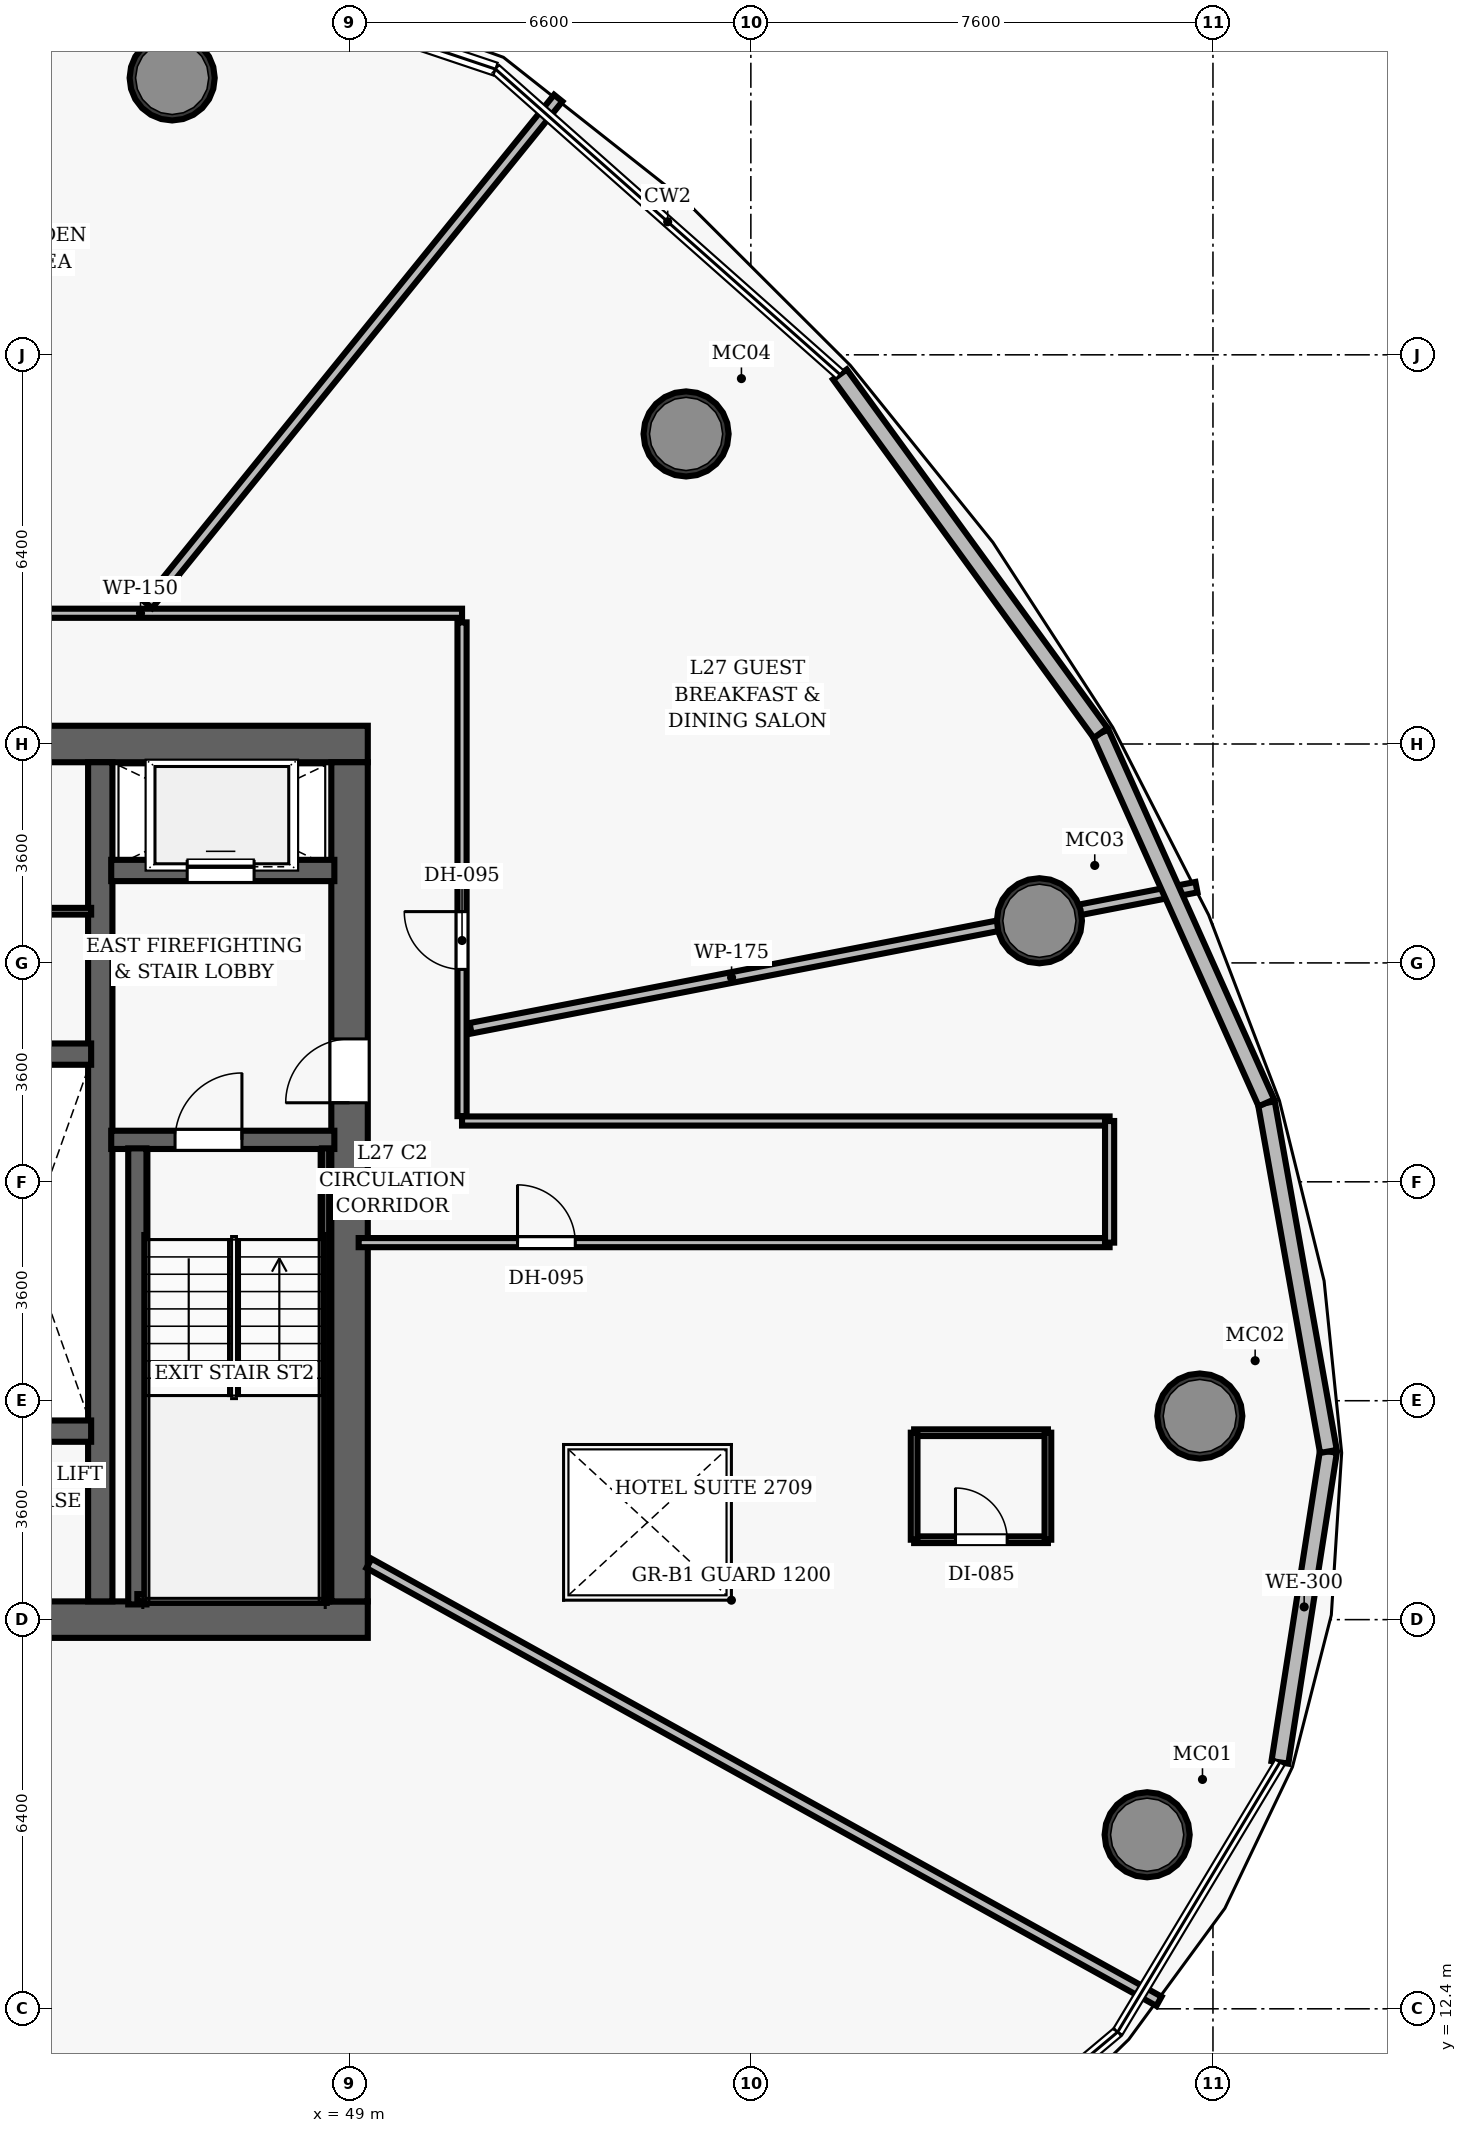
"""IFC4 building model, lengths in metres.
Left out: names, types, materials, properties, quantities, classifications, styles, units other than length and angle.
Written with IfcOpenShell. Run it as: python <this file> out.ifc"""

import sys

from ifc_helpers import new_model, si_unit, direction, frame, frame_2d, origin, origin_2d, place, context, subcontext, project, spatial, rectangle, hollow_circle, extrude, element, fill, save


model = new_model("IFC4")
c1 = context("Model", 3, precision=1e-05, world=origin(), true_north=direction((0.0, 1.0)))
c2 = subcontext(c1, "Body", "Model", "MODEL_VIEW")
j1 = project(units=[si_unit("LENGTHUNIT", "METRE"), si_unit("PLANEANGLEUNIT", "RADIAN")], contexts=[c1])
p1 = place(None, origin())
s1 = spatial("IfcSite", under=j1, at=p1, CompositionType="ELEMENT")
p2 = place(p1, origin())
s2 = spatial("IfcBuilding", under=s1, at=p2, CompositionType="ELEMENT")
p3 = place(p2, frame((0.0, 0.0, 113.3)))
s3 = spatial("IfcBuildingStorey", under=s2, at=p3, CompositionType="ELEMENT", Elevation=113.3)
p4 = place(p3, frame((26.7, 18.8, 0.0), z_axis=(0.0, 0.0, 1.0), x_axis=(1.0, 0.0, 0.0)))
e1 = element("IfcWall", 1, at=p4, inside=s3, PredefinedType="SHEAR", context=c2, shape_type="SweptSolid", body=[
    extrude(rectangle(XDim=22.6, YDim=0.6, at=frame_2d((11.3, 0.0))), origin(), (0.0, 0.0, 1.0), 3.5),
])
p5 = place(p4, frame((14.52, 0.0, 0.0)))
e2 = element("IfcOpeningElement", 2, at=p5, cuts=e1, PredefinedType="OPENING", context=c2, shape_type="SweptSolid", body=[
    extrude(rectangle(XDim=1.05, YDim=2.15, at=frame_2d((0.525, 1.075))), frame((0.0, 0.31, 0.0), z_axis=(0.0, -1.0, 0.0), x_axis=(1.0, 0.0, 0.0)), (0.0, 0.0, 1.0), 0.62),
])
p6 = place(p3, frame((26.7, 33.2, 0.0), z_axis=(0.0, 0.0, 1.0), x_axis=(1.0, 0.0, 0.0)))
e3 = element("IfcWall", 3, at=p6, inside=s3, PredefinedType="SHEAR", context=c2, shape_type="SweptSolid", body=[
    extrude(rectangle(XDim=22.6, YDim=0.6, at=frame_2d((11.3, 0.0))), origin(), (0.0, 0.0, 1.0), 3.5),
])
p7 = place(p6, frame((4.62, 0.0, 0.0)))
e4 = element("IfcOpeningElement", 4, at=p7, cuts=e3, PredefinedType="OPENING", context=c2, shape_type="SweptSolid", body=[
    extrude(rectangle(XDim=1.05, YDim=2.15, at=frame_2d((0.525, 1.075))), frame((0.0, 0.31, 0.0), z_axis=(0.0, -1.0, 0.0), x_axis=(1.0, 0.0, 0.0)), (0.0, 0.0, 1.0), 0.62),
])
p8 = place(p6, frame((14.52, 0.0, 0.0)))
e5 = element("IfcOpeningElement", 5, at=p8, cuts=e3, PredefinedType="OPENING", context=c2, shape_type="SweptSolid", body=[
    extrude(rectangle(XDim=1.05, YDim=2.15, at=frame_2d((0.525, 1.075))), frame((0.0, 0.31, 0.0), z_axis=(0.0, -1.0, 0.0), x_axis=(1.0, 0.0, 0.0)), (0.0, 0.0, 1.0), 0.62),
])
p9 = place(p3, frame((49.0, 19.1, 0.0), z_axis=(0.0, 0.0, 1.0), x_axis=(0.0, 1.0, 0.0)))
e6 = element("IfcWall", 6, at=p9, inside=s3, PredefinedType="SHEAR", context=c2, shape_type="SweptSolid", body=[
    extrude(rectangle(XDim=13.8, YDim=0.6, at=frame_2d((6.9, 0.0))), origin(), (0.0, 0.0, 1.0), 3.5),
])
p10 = place(p9, frame((8.2, 0.0, 0.0)))
e7 = element("IfcOpeningElement", 7, at=p10, cuts=e6, PredefinedType="OPENING", context=c2, shape_type="SweptSolid", body=[
    extrude(rectangle(XDim=1.05, YDim=2.15, at=frame_2d((0.525, 1.075))), frame((0.0, 0.31, 0.0), z_axis=(0.0, -1.0, 0.0), x_axis=(1.0, 0.0, 0.0)), (0.0, 0.0, 1.0), 0.62),
])
p11 = place(p3, frame((44.9, 19.1, 0.0), z_axis=(0.0, 0.0, 1.0), x_axis=(0.0, 1.0, 0.0)))
e8 = element("IfcWall", 8, at=p11, inside=s3, PredefinedType="SHEAR", context=c2, shape_type="SweptSolid", body=[
    extrude(rectangle(XDim=13.8, YDim=0.4, at=frame_2d((6.9, 0.0))), origin(), (0.0, 0.0, 1.0), 3.5),
])
for number, where, z_axis, x_axis in (
    (9, (62.118, 15.262, 0.0), (0.0, 0.0, 1.0), (1.0, 0.0, 0.0)),
    (10, (62.984, 22.148, 0.0), (0.0, 0.0, 1.0), (1.0, 0.0, 0.0)),
    (11, (60.346, 30.293, 0.0), (0.0, 0.0, 1.0), (1.0, 0.0, 0.0)),
    (12, (54.535, 38.299, 0.0), (0.0, 0.0, 1.0), (1.0, 0.0, 0.0)),
    (13, (46.083, 44.154, 0.0), (0.0, 0.0, 1.0), (1.0, 0.0, 0.0)),
):
    element("IfcColumn", number, at=place(p3, frame(where, z_axis=z_axis, x_axis=x_axis)), inside=s3, PredefinedType="COLUMN", context=c2, shape_type="SweptSolid", body=[
        extrude(hollow_circle(Radius=0.7, WallThickness=0.055, at=origin_2d()), origin(), (0.0, 0.0, 1.0), 3.5),
    ])
p12 = place(p3, frame((45.08, 26.69, 0.0), z_axis=(0.0, 0.0, 1.0), x_axis=(1.0, 0.0, 0.0)))
e14 = element("IfcWall", 14, at=p12, inside=s3, PredefinedType="SHEAR", context=c2, shape_type="SweptSolid", body=[
    extrude(rectangle(XDim=3.67, YDim=0.3, at=frame_2d((1.835, 0.0))), origin(), (0.0, 0.0, 1.0), 3.5),
])
p13 = place(p12, frame((1.05, 0.0, 0.0)))
e15 = element("IfcOpeningElement", 15, at=p13, cuts=e14, PredefinedType="OPENING", context=c2, shape_type="SweptSolid", body=[
    extrude(rectangle(XDim=1.1, YDim=2.15, at=frame_2d((0.55, 1.075))), frame((0.0, 0.16, 0.0), z_axis=(0.0, -1.0, 0.0), x_axis=(1.0, 0.0, 0.0)), (0.0, 0.0, 1.0), 0.32),
])
p14 = place(p3, frame((45.51, 19.05, 0.0), z_axis=(0.0, 0.0, 1.0), x_axis=(0.0, 1.0, 0.0)))
e16 = element("IfcWall", 16, at=p14, inside=s3, PredefinedType="SHEAR", context=c2, shape_type="SweptSolid", body=[
    extrude(rectangle(XDim=7.5, YDim=0.3, at=frame_2d((3.75, 0.0))), origin(), (0.0, 0.0, 1.0), 3.5),
])
p15 = place(p3, frame((48.605, 19.1, 0.0), z_axis=(0.0, 0.0, 1.0), x_axis=(0.0, 1.0, 0.0)))
e17 = element("IfcWall", 17, at=p15, inside=s3, PredefinedType="SHEAR", context=c2, shape_type="SweptSolid", body=[
    extrude(rectangle(XDim=7.45, YDim=0.12, at=frame_2d((3.725, 0.0))), origin(), (0.0, 0.0, 1.0), 3.5),
])
p16 = place(p3, frame((45.51, 19.16, 0.0), z_axis=(0.0, 0.0, 1.0), x_axis=(1.0, 0.0, 0.0)))
e18 = element("IfcWall", 18, at=p16, inside=s3, PredefinedType="SHEAR", context=c2, shape_type="SweptSolid", body=[
    extrude(rectangle(XDim=3.095, YDim=0.12, at=frame_2d((1.547, 0.0))), origin(), (0.0, 0.0, 1.0), 3.5),
])
p17 = place(p3, frame((45.08, 31.12, 0.0), z_axis=(0.0, 0.0, 1.0), x_axis=(1.0, 0.0, 0.0)))
e19 = element("IfcWall", 19, at=p17, inside=s3, PredefinedType="SHEAR", context=c2, shape_type="SweptSolid", body=[
    extrude(rectangle(XDim=3.67, YDim=0.35, at=frame_2d((1.835, 0.0))), origin(), (0.0, 0.0, 1.0), 2.675),
])
p18 = place(p17, frame((1.25, 0.0, 0.0)))
e20 = element("IfcOpeningElement", 20, at=p18, cuts=e19, PredefinedType="OPENING", context=c2, shape_type="SweptSolid", body=[
    extrude(rectangle(XDim=1.1, YDim=2.15, at=frame_2d((0.55, 1.075))), frame((0.0, 0.185, 0.0), z_axis=(0.0, -1.0, 0.0), x_axis=(1.0, 0.0, 0.0)), (0.0, 0.0, 1.0), 0.37),
])
for number, where, z_axis, x_axis in (
    (21, (42.72, 21.9, 0.0), (0.0, 0.0, 1.0), (1.0, 0.0, 0.0)),
    (22, (42.72, 28.1, 0.0), (0.0, 0.0, 1.0), (1.0, 0.0, 0.0)),
):
    element("IfcWall", number, at=place(p3, frame(where, z_axis=z_axis, x_axis=x_axis)), inside=s3, PredefinedType="SHEAR", context=c2, shape_type="SweptSolid", body=[
        extrude(rectangle(XDim=2.03, YDim=0.35, at=frame_2d((1.015, 0.0))), origin(), (0.0, 0.0, 1.0), 2.675),
    ])
p19 = place(p3, frame((42.55, 30.45, 0.0), z_axis=(0.0, 0.0, 1.0), x_axis=(1.0, 0.0, 0.0)))
e23 = element("IfcWall", 23, at=p19, inside=s3, PredefinedType="PARTITIONING", context=c2, shape_type="SweptSolid", body=[
    extrude(rectangle(XDim=2.2, YDim=0.11, at=frame_2d((1.1, 0.0))), origin(), (0.0, 0.0, 1.0), 2.675),
])
p20 = place(p3, frame((24.85, 35.35, 0.0), z_axis=(0.0, 0.0, 1.0), x_axis=(1.0, 0.0, 0.0)))
e24 = element("IfcWall", 24, at=p20, inside=s3, PredefinedType="PARTITIONING", context=c2, shape_type="SweptSolid", body=[
    extrude(rectangle(XDim=26.0, YDim=0.15, at=frame_2d((13.0, 0.0))), origin(), (0.0, 0.0, 1.0), 2.675),
])
p21 = place(p20, frame((14.325, 0.0, 0.0)))
e25 = element("IfcOpeningElement", 25, at=p21, cuts=e24, PredefinedType="OPENING", context=c2, shape_type="SweptSolid", body=[
    extrude(rectangle(XDim=0.95, YDim=2.15, at=frame_2d((0.475, 1.075))), frame((0.0, 0.085, 0.0), z_axis=(0.0, -1.0, 0.0), x_axis=(1.0, 0.0, 0.0)), (0.0, 0.0, 1.0), 0.17),
])
p22 = place(p20, frame((7.162, 0.0, 0.0)))
e26 = element("IfcOpeningElement", 26, at=p22, cuts=e24, PredefinedType="OPENING", context=c2, shape_type="SweptSolid", body=[
    extrude(rectangle(XDim=0.95, YDim=2.15, at=frame_2d((0.475, 1.075))), frame((0.0, 0.085, 0.0), z_axis=(0.0, -1.0, 0.0), x_axis=(1.0, 0.0, 0.0)), (0.0, 0.0, 1.0), 0.17),
])
p23 = place(p3, frame((50.85, 27.08, 0.0), z_axis=(0.0, 0.0, 1.0), x_axis=(0.0, 1.0, 0.0)))
e27 = element("IfcWall", 27, at=p23, inside=s3, PredefinedType="PARTITIONING", context=c2, shape_type="SweptSolid", body=[
    extrude(rectangle(XDim=8.12, YDim=0.15, at=frame_2d((4.06, 0.0))), origin(), (0.0, 0.0, 1.0), 2.675),
])
p24 = place(p23, frame((2.414, 0.0, 0.0)))
e28 = element("IfcOpeningElement", 28, at=p24, cuts=e27, PredefinedType="OPENING", context=c2, shape_type="SweptSolid", body=[
    extrude(rectangle(XDim=0.95, YDim=2.15, at=frame_2d((0.475, 1.075))), frame((0.0, 0.085, 0.0), z_axis=(0.0, -1.0, 0.0), x_axis=(1.0, 0.0, 0.0)), (0.0, 0.0, 1.0), 0.17),
])
p25 = place(p3, frame((50.85, 27.0, 0.0), z_axis=(0.0, 0.0, 1.0), x_axis=(1.0, 0.0, 0.0)))
e29 = element("IfcWall", 29, at=p25, inside=s3, PredefinedType="PARTITIONING", context=c2, shape_type="SweptSolid", body=[
    extrude(rectangle(XDim=10.65, YDim=0.15, at=frame_2d((5.325, 0.0))), origin(), (0.0, 0.0, 1.0), 2.675),
])
p26 = place(p3, frame((49.15, 25.0, 0.0), z_axis=(0.0, 0.0, 1.0), x_axis=(1.0, 0.0, 0.0)))
e30 = element("IfcWall", 30, at=p26, inside=s3, PredefinedType="PARTITIONING", context=c2, shape_type="SweptSolid", body=[
    extrude(rectangle(XDim=12.35, YDim=0.15, at=frame_2d((6.175, 0.0))), origin(), (0.0, 0.0, 1.0), 2.675),
])
p27 = place(p26, frame((2.613, 0.0, 0.0)))
e31 = element("IfcOpeningElement", 31, at=p27, cuts=e30, PredefinedType="OPENING", context=c2, shape_type="SweptSolid", body=[
    extrude(rectangle(XDim=0.95, YDim=2.15, at=frame_2d((0.475, 1.075))), frame((0.0, 0.085, 0.0), z_axis=(0.0, -1.0, 0.0), x_axis=(1.0, 0.0, 0.0)), (0.0, 0.0, 1.0), 0.17),
])
p28 = place(p3, frame((61.5, 25.0, 0.0), z_axis=(0.0, 0.0, 1.0), x_axis=(0.0, 1.0, 0.0)))
e32 = element("IfcWall", 32, at=p28, inside=s3, PredefinedType="PARTITIONING", context=c2, shape_type="SweptSolid", body=[
    extrude(rectangle(XDim=2.0, YDim=0.15, at=frame_2d((1.0, 0.0))), origin(), (0.0, 0.0, 1.0), 2.675),
])
p29 = place(p3, frame((50.99, 28.525, 0.0), z_axis=(0.0, 0.0, 1.0), x_axis=(0.981623433526, 0.190828286041, 0.0)))
e33 = element("IfcWall", 33, at=p29, inside=s3, PredefinedType="PARTITIONING", context=c2, shape_type="SweptSolid", body=[
    extrude(rectangle(XDim=12.162, YDim=0.175, at=frame_2d((6.081, 0.0))), origin(), (0.0, 0.0, 1.0), 2.675),
])
p30 = place(p3, frame((45.685, 35.49, 0.0), z_axis=(0.0, 0.0, 1.0), x_axis=(0.629313518397, 0.777151526771, 0.0)))
e34 = element("IfcWall", 34, at=p30, inside=s3, PredefinedType="PARTITIONING", context=c2, shape_type="SweptSolid", body=[
    extrude(rectangle(XDim=10.721, YDim=0.175, at=frame_2d((5.36, 0.0))), origin(), (0.0, 0.0, 1.0), 2.675),
])
p31 = place(p3, frame((41.643, 16.51, 0.0), z_axis=(0.0, 0.0, 1.0), x_axis=(0.358375658047, -0.933577467444, 0.0)))
e35 = element("IfcWall", 35, at=p31, inside=s3, PredefinedType="PARTITIONING", context=c2, shape_type="SweptSolid", body=[
    extrude(rectangle(XDim=13.612, YDim=0.175, at=frame_2d((6.806, 0.0))), origin(), (0.0, 0.0, 1.0), 2.675),
])
p32 = place(p3, frame((49.32, 19.725, 0.0), z_axis=(0.0, 0.0, 1.0), x_axis=(0.874623583145, -0.484802627681, 0.0)))
e36 = element("IfcWall", 36, at=p32, inside=s3, PredefinedType="PARTITIONING", context=c2, shape_type="SweptSolid", body=[
    extrude(rectangle(XDim=14.854, YDim=0.175, at=frame_2d((7.427, 0.0))), origin(), (0.0, 0.0, 1.0), 2.675),
])
p33 = place(p3, frame((58.285, 20.114, 0.0), z_axis=(0.0, 0.0, 1.0), x_axis=(1.0, 0.0, 0.0)))
e37 = element("IfcWall", 37, at=p33, inside=s3, PredefinedType="PARTITIONING", context=c2, shape_type="SweptSolid", body=[
    extrude(rectangle(XDim=2.2, YDim=0.11, at=frame_2d((1.1, 0.0))), origin(), (0.0, 0.0, 1.0), 2.675),
])
p34 = place(p33, frame((0.68, 0.0, 0.0)))
e38 = element("IfcOpeningElement", 38, at=p34, cuts=e37, PredefinedType="OPENING", context=c2, shape_type="SweptSolid", body=[
    extrude(rectangle(XDim=0.85, YDim=2.1, at=frame_2d((0.425, 1.05))), frame((0.0, 0.065, 0.0), z_axis=(0.0, -1.0, 0.0), x_axis=(1.0, 0.0, 0.0)), (0.0, 0.0, 1.0), 0.13),
])
p35 = place(p3, frame((58.285, 21.874, 0.0), z_axis=(0.0, 0.0, 1.0), x_axis=(1.0, 0.0, 0.0)))
e39 = element("IfcWall", 39, at=p35, inside=s3, PredefinedType="PARTITIONING", context=c2, shape_type="SweptSolid", body=[
    extrude(rectangle(XDim=2.2, YDim=0.11, at=frame_2d((1.1, 0.0))), origin(), (0.0, 0.0, 1.0), 2.675),
])
for number, where, z_axis, x_axis in (
    (40, (58.285, 20.114, 0.0), (0.0, 0.0, 1.0), (0.0, 1.0, 0.0)),
    (41, (60.485, 20.114, 0.0), (0.0, 0.0, 1.0), (0.0, 1.0, 0.0)),
):
    element("IfcWall", number, at=place(p3, frame(where, z_axis=z_axis, x_axis=x_axis)), inside=s3, PredefinedType="PARTITIONING", context=c2, shape_type="SweptSolid", body=[
        extrude(rectangle(XDim=1.76, YDim=0.11, at=frame_2d((0.88, 0.0))), origin(), (0.0, 0.0, 1.0), 2.675),
    ])
p36 = place(p3, frame((65.099, 21.566, 0.0), z_axis=(0.0, 0.0, 1.0), x_axis=(-0.154237267415, -0.988033838156, 0.0)))
e42 = element("IfcWall", 42, at=p36, inside=s3, PredefinedType="SOLIDWALL", context=c2, shape_type="SweptSolid", body=[
    extrude(rectangle(XDim=5.175, YDim=0.28, at=frame_2d((2.587, 0.0))), origin(), (0.0, 0.0, 1.0), 3.26),
])
p37 = place(p3, frame((64.079, 27.298, 0.0), z_axis=(0.0, 0.0, 1.0), x_axis=(0.1752202949, -0.984529252107, 0.0)))
e43 = element("IfcWall", 43, at=p37, inside=s3, PredefinedType="SOLIDWALL", context=c2, shape_type="SweptSolid", body=[
    extrude(rectangle(XDim=5.823, YDim=0.28, at=frame_2d((2.911, 0.0))), origin(), (0.0, 0.0, 1.0), 3.26),
])
p38 = place(p3, frame((61.353, 33.381, 0.0), z_axis=(0.0, 0.0, 1.0), x_axis=(0.408937052671, -0.912562593444, 0.0)))
e44 = element("IfcWall", 44, at=p38, inside=s3, PredefinedType="SOLIDWALL", context=c2, shape_type="SweptSolid", body=[
    extrude(rectangle(XDim=6.665, YDim=0.28, at=frame_2d((3.333, 0.0))), origin(), (0.0, 0.0, 1.0), 3.26),
])
p39 = place(p3, frame((57.064, 39.278, 0.0), z_axis=(0.0, 0.0, 1.0), x_axis=(0.588127899996, -0.808767935347, 0.0)))
e45 = element("IfcWall", 45, at=p39, inside=s3, PredefinedType="SOLIDWALL", context=c2, shape_type="SweptSolid", body=[
    extrude(rectangle(XDim=7.292, YDim=0.28, at=frame_2d((3.646, 0.0))), origin(), (0.0, 0.0, 1.0), 3.26),
])
p40 = place(p13, origin())
e46 = element("IfcDoor", 46, at=p40, inside=s3, OperationType="SINGLE_SWING_RIGHT", PredefinedType="DOOR", context=c2, shape_type="SweptSolid", body=[
    extrude(rectangle(XDim=1.1, YDim=2.15, at=frame_2d((0.55, 1.075))), frame((0.0, 0.025, 0.0), z_axis=(0.0, -1.0, 0.0), x_axis=(1.0, 0.0, 0.0)), (0.0, 0.0, 1.0), 0.05),
])
fill(e15, e46)
p41 = place(p10, origin())
e47 = element("IfcDoor", 47, at=p41, inside=s3, OperationType="SINGLE_SWING_LEFT", PredefinedType="DOOR", context=c2, shape_type="SweptSolid", body=[
    extrude(rectangle(XDim=1.05, YDim=2.15, at=frame_2d((0.525, 1.075))), frame((0.0, 0.025, 0.0), z_axis=(0.0, -1.0, 0.0), x_axis=(1.0, 0.0, 0.0)), (0.0, 0.0, 1.0), 0.05),
])
fill(e7, e47)
p42 = place(p24, origin())
e48 = element("IfcDoor", 48, at=p42, inside=s3, OperationType="SINGLE_SWING_RIGHT", PredefinedType="DOOR", context=c2, shape_type="SweptSolid", body=[
    extrude(rectangle(XDim=0.95, YDim=2.15, at=frame_2d((0.475, 1.075))), frame((0.0, 0.025, 0.0), z_axis=(0.0, -1.0, 0.0), x_axis=(1.0, 0.0, 0.0)), (0.0, 0.0, 1.0), 0.05),
])
fill(e28, e48)
p43 = place(p27, origin())
e49 = element("IfcDoor", 49, at=p43, inside=s3, OperationType="SINGLE_SWING_LEFT", PredefinedType="DOOR", context=c2, shape_type="SweptSolid", body=[
    extrude(rectangle(XDim=0.95, YDim=2.15, at=frame_2d((0.475, 1.075))), frame((0.0, 0.025, 0.0), z_axis=(0.0, -1.0, 0.0), x_axis=(1.0, 0.0, 0.0)), (0.0, 0.0, 1.0), 0.05),
])
fill(e31, e49)
p44 = place(p34, origin())
e50 = element("IfcDoor", 50, at=p44, inside=s3, OperationType="SINGLE_SWING_LEFT", PredefinedType="DOOR", context=c2, shape_type="SweptSolid", body=[
    extrude(rectangle(XDim=0.85, YDim=2.1, at=frame_2d((0.425, 1.05))), frame((0.0, 0.025, 0.0), z_axis=(0.0, -1.0, 0.0), x_axis=(1.0, 0.0, 0.0)), (0.0, 0.0, 1.0), 0.05),
])
fill(e38, e50)
p45 = place(p18, origin())
e51 = element("IfcDoor", 51, at=p45, inside=s3, OperationType="SLIDING_TO_LEFT", PredefinedType="DOOR", context=c2, shape_type="SweptSolid", body=[
    extrude(rectangle(XDim=1.1, YDim=2.15, at=frame_2d((0.55, 1.075))), frame((0.0, 0.025, 0.0), z_axis=(0.0, -1.0, 0.0), x_axis=(1.0, 0.0, 0.0)), (0.0, 0.0, 1.0), 0.05),
])
fill(e20, e51)
save(model, sys.argv[1])
